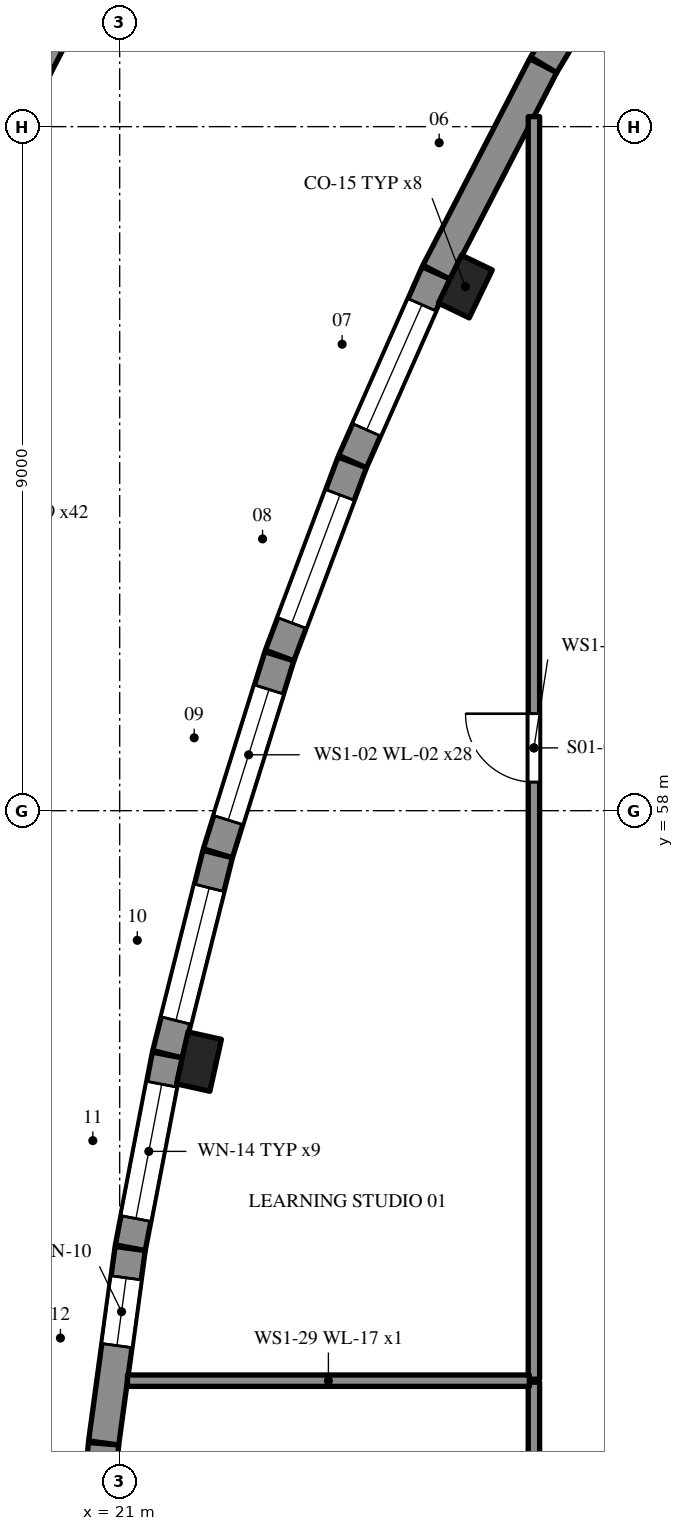
"""IFC4 building model, lengths in metres.
Left out: names, types, materials, properties, quantities, classifications, styles, units other than length and angle.
Written with IfcOpenShell. Run it as: python <this file> out.ifc"""

import sys

from ifc_helpers import new_model, si_unit, direction, frame, frame_2d, origin, origin_2d, place, context, subcontext, project, spatial, rectangle, extrude, element, fill, save


model = new_model("IFC4")
c1 = context("Model", 3, precision=1e-05, world=origin(), true_north=direction((0.0, 1.0)))
c2 = subcontext(c1, "Body", "Model", "MODEL_VIEW")
j1 = project(units=[si_unit("LENGTHUNIT", "METRE"), si_unit("PLANEANGLEUNIT", "RADIAN")], contexts=[c1])
p1 = place(None, origin())
s1 = spatial("IfcSite", under=j1, at=p1, CompositionType="ELEMENT")
p2 = place(p1, origin())
s2 = spatial("IfcBuilding", under=s1, at=p2, CompositionType="ELEMENT")
p3 = place(p2, frame((0.0, 0.0, 5.4)))
s3 = spatial("IfcBuildingStorey", under=s2, at=p3, CompositionType="ELEMENT", Elevation=5.4)
p4 = place(p3, frame((20.01, 67.739, 0.0), z_axis=(0.0, 0.0, 1.0), x_axis=(0.459334200234, 0.888263526492, 0.0)))
e1 = element("IfcWall", 1, at=p4, inside=s3, PredefinedType="PARAPET", context=c2, shape_type="SweptSolid", body=[
    extrude(rectangle(XDim=2.545, YDim=0.18, at=frame_2d((1.273, 0.0))), origin(), (0.0, 0.0, 1.0), 0.7),
])
p5 = place(p3, frame((28.154, 70.434, 0.0), z_axis=(0.0, 0.0, 1.0), x_axis=(-0.515387841983, -0.856957042293, 0.0)))
e2 = element("IfcWall", 2, at=p5, inside=s3, PredefinedType="SOLIDWALL", context=c2, shape_type="SweptSolid", body=[
    extrude(rectangle(XDim=3.058, YDim=0.4, at=frame_2d((1.529, 0.0))), origin(), (0.0, 0.0, 1.0), 4.5),
])
p6 = place(p3, frame((26.572, 67.802, 0.0), z_axis=(0.0, 0.0, 1.0), x_axis=(-0.45930565039, -0.888278289457, 0.0)))
e3 = element("IfcWall", 3, at=p6, inside=s3, PredefinedType="SOLIDWALL", context=c2, shape_type="SweptSolid", body=[
    extrude(rectangle(XDim=3.059, YDim=0.4, at=frame_2d((1.529, 0.0))), origin(), (0.0, 0.0, 1.0), 4.5),
])
p7 = place(p3, frame((25.162, 65.075, 0.0), z_axis=(0.0, 0.0, 1.0), x_axis=(-0.404652153757, -0.914470685402, 0.0)))
e4 = element("IfcWall", 4, at=p7, inside=s3, PredefinedType="SOLIDWALL", context=c2, shape_type="SweptSolid", body=[
    extrude(rectangle(XDim=2.714, YDim=0.4, at=frame_2d((1.357, 0.0))), origin(), (0.0, 0.0, 1.0), 4.5),
])
p8 = place(p7, frame((0.457, 0.0, 0.9)))
e5 = element("IfcOpeningElement", 5, at=p8, cuts=e4, PredefinedType="OPENING", context=c2, shape_type="SweptSolid", body=[
    extrude(rectangle(XDim=1.8, YDim=2.1, at=frame_2d((0.9, 1.05))), frame((0.0, 0.21, 0.0), z_axis=(0.0, -1.0, 0.0), x_axis=(1.0, 0.0, 0.0)), (0.0, 0.0, 1.0), 0.42),
])
p9 = place(p3, frame((24.06, 62.583, 0.0), z_axis=(0.0, 0.0, 1.0), x_axis=(-0.351862601417, -0.936051659752, 0.0)))
e6 = element("IfcWall", 6, at=p9, inside=s3, PredefinedType="SOLIDWALL", context=c2, shape_type="SweptSolid", body=[
    extrude(rectangle(XDim=2.714, YDim=0.4, at=frame_2d((1.357, 0.0))), origin(), (0.0, 0.0, 1.0), 4.5),
])
p10 = place(p9, frame((0.457, 0.0, 0.9)))
e7 = element("IfcOpeningElement", 7, at=p10, cuts=e6, PredefinedType="OPENING", context=c2, shape_type="SweptSolid", body=[
    extrude(rectangle(XDim=1.8, YDim=2.1, at=frame_2d((0.9, 1.05))), frame((0.0, 0.21, 0.0), z_axis=(0.0, -1.0, 0.0), x_axis=(1.0, 0.0, 0.0)), (0.0, 0.0, 1.0), 0.42),
])
p11 = place(p3, frame((23.101, 60.031, 0.0), z_axis=(0.0, 0.0, 1.0), x_axis=(-0.29795748067, -0.954579142718, 0.0)))
e8 = element("IfcWall", 8, at=p11, inside=s3, PredefinedType="SOLIDWALL", context=c2, shape_type="SweptSolid", body=[
    extrude(rectangle(XDim=2.715, YDim=0.4, at=frame_2d((1.357, 0.0))), origin(), (0.0, 0.0, 1.0), 4.5),
])
p12 = place(p11, frame((0.457, 0.0, 0.9)))
e9 = element("IfcOpeningElement", 9, at=p12, cuts=e8, PredefinedType="OPENING", context=c2, shape_type="SweptSolid", body=[
    extrude(rectangle(XDim=1.8, YDim=2.1, at=frame_2d((0.9, 1.05))), frame((0.0, 0.21, 0.0), z_axis=(0.0, -1.0, 0.0), x_axis=(1.0, 0.0, 0.0)), (0.0, 0.0, 1.0), 0.42),
])
p13 = place(p3, frame((22.289, 57.429, 0.0), z_axis=(0.0, 0.0, 1.0), x_axis=(-0.2430011368, -0.970026003525, 0.0)))
e10 = element("IfcWall", 10, at=p13, inside=s3, PredefinedType="SOLIDWALL", context=c2, shape_type="SweptSolid", body=[
    extrude(rectangle(XDim=2.715, YDim=0.4, at=frame_2d((1.357, 0.0))), origin(), (0.0, 0.0, 1.0), 4.5),
])
p14 = place(p13, frame((0.458, 0.0, 0.9)))
e11 = element("IfcOpeningElement", 11, at=p14, cuts=e10, PredefinedType="OPENING", context=c2, shape_type="SweptSolid", body=[
    extrude(rectangle(XDim=1.8, YDim=2.1, at=frame_2d((0.9, 1.05))), frame((0.0, 0.21, 0.0), z_axis=(0.0, -1.0, 0.0), x_axis=(1.0, 0.0, 0.0)), (0.0, 0.0, 1.0), 0.42),
])
p15 = place(p3, frame((21.627, 54.785, 0.0), z_axis=(0.0, 0.0, 1.0), x_axis=(-0.188763210152, -0.982022632373, 0.0)))
e12 = element("IfcWall", 12, at=p15, inside=s3, PredefinedType="SOLIDWALL", context=c2, shape_type="SweptSolid", body=[
    extrude(rectangle(XDim=2.582, YDim=0.4, at=frame_2d((1.291, 0.0))), origin(), (0.0, 0.0, 1.0), 4.5),
])
p16 = place(p15, frame((0.391, 0.0, 0.9)))
e13 = element("IfcOpeningElement", 13, at=p16, cuts=e12, PredefinedType="OPENING", context=c2, shape_type="SweptSolid", body=[
    extrude(rectangle(XDim=1.8, YDim=2.1, at=frame_2d((0.9, 1.05))), frame((0.0, 0.21, 0.0), z_axis=(0.0, -1.0, 0.0), x_axis=(1.0, 0.0, 0.0)), (0.0, 0.0, 1.0), 0.42),
])
p17 = place(p3, frame((21.138, 52.239, 0.0), z_axis=(0.0, 0.0, 1.0), x_axis=(-0.13522291824, -0.990815200924, 0.0)))
e14 = element("IfcWall", 14, at=p17, inside=s3, PredefinedType="SOLIDWALL", context=c2, shape_type="SweptSolid", body=[
    extrude(rectangle(XDim=2.582, YDim=0.4, at=frame_2d((1.291, 0.0))), origin(), (0.0, 0.0, 1.0), 4.5),
])
p18 = place(p17, frame((0.389, 0.0, 0.9)))
e15 = element("IfcOpeningElement", 15, at=p18, cuts=e14, PredefinedType="OPENING", context=c2, shape_type="SweptSolid", body=[
    extrude(rectangle(XDim=0.9, YDim=2.1, at=frame_2d((0.45, 1.05))), frame((0.0, 0.21, 0.0), z_axis=(0.0, -1.0, 0.0), x_axis=(1.0, 0.0, 0.0)), (0.0, 0.0, 1.0), 0.42),
])
p19 = place(p3, frame((20.788, 49.67, 0.0), z_axis=(0.0, 0.0, 1.0), x_axis=(-0.081323667998, -0.996687744995, 0.0)))
e16 = element("IfcWall", 16, at=p19, inside=s3, PredefinedType="SOLIDWALL", context=c2, shape_type="SweptSolid", body=[
    extrude(rectangle(XDim=2.582, YDim=0.4, at=frame_2d((1.291, 0.0))), origin(), (0.0, 0.0, 1.0), 4.5),
])
p20 = place(p19, frame((0.391, 0.0, 0.9)))
e17 = element("IfcOpeningElement", 17, at=p20, cuts=e16, PredefinedType="OPENING", context=c2, shape_type="SweptSolid", body=[
    extrude(rectangle(XDim=1.8, YDim=2.1, at=frame_2d((0.9, 1.05))), frame((0.0, 0.21, 0.0), z_axis=(0.0, -1.0, 0.0), x_axis=(1.0, 0.0, 0.0)), (0.0, 0.0, 1.0), 0.42),
])
for number, where, z_axis, x_axis in (
    (18, (22.043, 54.698, 0.0), (0.0, 0.0, 1.0), (-0.217, -0.976, 0.0)),
    (19, (25.548, 64.896, 0.0), (0.0, 0.0, 1.0), (-0.434, -0.901, 0.0)),
):
    element("IfcColumn", number, at=place(p3, frame(where, z_axis=z_axis, x_axis=x_axis)), inside=s3, PredefinedType="PILASTER", context=c2, shape_type="SweptSolid", body=[
        extrude(rectangle(XDim=0.7, YDim=0.45, at=origin_2d()), origin(), (0.0, 0.0, 1.0), 4.5),
    ])
p21 = place(p3, frame((26.45, 36.52, 0.0), z_axis=(0.0, 0.0, 1.0), x_axis=(0.0, 1.0, 0.0)))
e20 = element("IfcWall", 20, at=p21, inside=s3, PredefinedType="PARTITIONING", context=c2, shape_type="SweptSolid", body=[
    extrude(rectangle(XDim=13.96, YDim=0.15, at=frame_2d((6.98, 0.0))), origin(), (0.0, 0.0, 1.0), 4.5),
])
p22 = place(p21, frame((6.53, 0.0, 0.0)))
e21 = element("IfcOpeningElement", 21, at=p22, cuts=e20, PredefinedType="OPENING", context=c2, shape_type="SweptSolid", body=[
    extrude(rectangle(XDim=0.9, YDim=2.1, at=frame_2d((0.45, 1.05))), frame((0.0, 0.085, 0.0), z_axis=(0.0, -1.0, 0.0), x_axis=(1.0, 0.0, 0.0)), (0.0, 0.0, 1.0), 0.17),
])
p23 = place(p3, frame((26.45, 50.52, 0.0), z_axis=(0.0, 0.0, 1.0), x_axis=(0.0, 1.0, 0.0)))
e22 = element("IfcWall", 22, at=p23, inside=s3, PredefinedType="PARTITIONING", context=c2, shape_type="SweptSolid", body=[
    extrude(rectangle(XDim=16.612, YDim=0.15, at=frame_2d((8.306, 0.0))), origin(), (0.0, 0.0, 1.0), 4.5),
])
p24 = place(p23, frame((7.856, 0.0, 0.0)))
e23 = element("IfcOpeningElement", 23, at=p24, cuts=e22, PredefinedType="OPENING", context=c2, shape_type="SweptSolid", body=[
    extrude(rectangle(XDim=0.9, YDim=2.1, at=frame_2d((0.45, 1.05))), frame((0.0, 0.085, 0.0), z_axis=(0.0, -1.0, 0.0), x_axis=(1.0, 0.0, 0.0)), (0.0, 0.0, 1.0), 0.17),
])
p25 = place(p3, frame((21.102, 50.5, 0.0), z_axis=(0.0, 0.0, 1.0), x_axis=(1.0, 0.0, 0.0)))
e24 = element("IfcWall", 24, at=p25, inside=s3, PredefinedType="PARTITIONING", context=c2, shape_type="SweptSolid", body=[
    extrude(rectangle(XDim=5.288, YDim=0.15, at=frame_2d((2.644, 0.0))), origin(), (0.0, 0.0, 1.0), 4.5),
])
p26 = place(p8, origin())
e25 = element("IfcWindow", 25, at=p26, inside=s3, PartitioningType="SINGLE_PANEL", PredefinedType="WINDOW", context=c2, shape_type="SweptSolid", body=[
    extrude(rectangle(XDim=1.8, YDim=2.1, at=frame_2d((0.9, 1.05))), frame((0.0, 0.03, 0.0), z_axis=(0.0, -1.0, 0.0), x_axis=(1.0, 0.0, 0.0)), (0.0, 0.0, 1.0), 0.06),
])
fill(e5, e25)
p27 = place(p10, origin())
e26 = element("IfcWindow", 26, at=p27, inside=s3, PartitioningType="SINGLE_PANEL", PredefinedType="WINDOW", context=c2, shape_type="SweptSolid", body=[
    extrude(rectangle(XDim=1.8, YDim=2.1, at=frame_2d((0.9, 1.05))), frame((0.0, 0.03, 0.0), z_axis=(0.0, -1.0, 0.0), x_axis=(1.0, 0.0, 0.0)), (0.0, 0.0, 1.0), 0.06),
])
fill(e7, e26)
p28 = place(p12, origin())
e27 = element("IfcWindow", 27, at=p28, inside=s3, PartitioningType="SINGLE_PANEL", PredefinedType="WINDOW", context=c2, shape_type="SweptSolid", body=[
    extrude(rectangle(XDim=1.8, YDim=2.1, at=frame_2d((0.9, 1.05))), frame((0.0, 0.03, 0.0), z_axis=(0.0, -1.0, 0.0), x_axis=(1.0, 0.0, 0.0)), (0.0, 0.0, 1.0), 0.06),
])
fill(e9, e27)
p29 = place(p14, origin())
e28 = element("IfcWindow", 28, at=p29, inside=s3, PartitioningType="SINGLE_PANEL", PredefinedType="WINDOW", context=c2, shape_type="SweptSolid", body=[
    extrude(rectangle(XDim=1.8, YDim=2.1, at=frame_2d((0.9, 1.05))), frame((0.0, 0.03, 0.0), z_axis=(0.0, -1.0, 0.0), x_axis=(1.0, 0.0, 0.0)), (0.0, 0.0, 1.0), 0.06),
])
fill(e11, e28)
p30 = place(p16, origin())
e29 = element("IfcWindow", 29, at=p30, inside=s3, PartitioningType="SINGLE_PANEL", PredefinedType="WINDOW", context=c2, shape_type="SweptSolid", body=[
    extrude(rectangle(XDim=1.8, YDim=2.1, at=frame_2d((0.9, 1.05))), frame((0.0, 0.03, 0.0), z_axis=(0.0, -1.0, 0.0), x_axis=(1.0, 0.0, 0.0)), (0.0, 0.0, 1.0), 0.06),
])
fill(e13, e29)
p31 = place(p18, origin())
e30 = element("IfcWindow", 30, at=p31, inside=s3, PartitioningType="SINGLE_PANEL", PredefinedType="WINDOW", context=c2, shape_type="SweptSolid", body=[
    extrude(rectangle(XDim=0.9, YDim=2.1, at=frame_2d((0.45, 1.05))), frame((0.0, 0.03, 0.0), z_axis=(0.0, -1.0, 0.0), x_axis=(1.0, 0.0, 0.0)), (0.0, 0.0, 1.0), 0.06),
])
fill(e15, e30)
p32 = place(p24, origin())
e31 = element("IfcDoor", 31, at=p32, inside=s3, OperationType="SINGLE_SWING_RIGHT", PredefinedType="DOOR", context=c2, shape_type="SweptSolid", body=[
    extrude(rectangle(XDim=0.9, YDim=2.1, at=frame_2d((0.45, 1.05))), frame((0.0, 0.025, 0.0), z_axis=(0.0, -1.0, 0.0), x_axis=(1.0, 0.0, 0.0)), (0.0, 0.0, 1.0), 0.05),
])
fill(e23, e31)
save(model, sys.argv[1])
